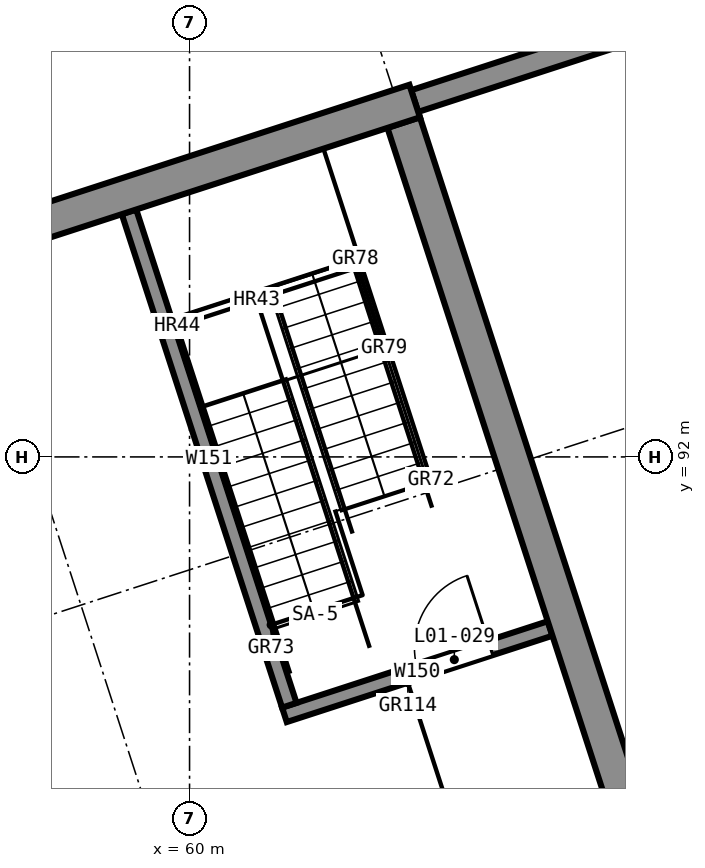
"""IFC4 building model, lengths in metres.
Left out: names, types, materials, properties, quantities, classifications, styles, units other than length and angle.
Written with IfcOpenShell. Run it as: python <this file> out.ifc"""

import sys

from ifc_helpers import new_model, si_unit, direction, frame, frame_2d, origin, place, context, subcontext, project, spatial, rectangle, extrude, element, fill, save


model = new_model("IFC4")
c1 = context("Model", 3, precision=1e-05, world=origin(), true_north=direction((0.0, 1.0)))
c2 = subcontext(c1, "Body", "Model", "MODEL_VIEW")
j1 = project(units=[si_unit("LENGTHUNIT", "METRE"), si_unit("PLANEANGLEUNIT", "RADIAN")], contexts=[c1])
p1 = place(None, origin())
s1 = spatial("IfcSite", under=j1, at=p1, CompositionType="ELEMENT")
p2 = place(p1, origin())
s2 = spatial("IfcBuilding", under=s1, at=p2, CompositionType="ELEMENT")
p3 = place(p2, frame((0.0, 0.0, 5.5)))
s3 = spatial("IfcBuildingStorey", under=s2, at=p3, CompositionType="ELEMENT", Elevation=5.5)
p4 = place(p3, frame((68.866, 77.781, 0.0), z_axis=(0.0, 0.0, 1.0), x_axis=(-0.309019798438, 0.951055605195, 0.0)))
e1 = element("IfcWall", 1, at=p4, inside=s3, PredefinedType="SHEAR", context=c2, shape_type="SweptSolid", body=[
    extrude(rectangle(XDim=19.575, YDim=0.45, at=frame_2d((9.788, 0.0))), origin(), (0.0, 0.0, 1.0), 4.0),
])
p5 = place(p3, frame((34.953, 87.581, 0.0), z_axis=(0.0, 0.0, 1.0), x_axis=(0.951059165148, 0.309008841924, 0.0)))
e2 = element("IfcWall", 2, at=p5, inside=s3, PredefinedType="SHEAR", context=c2, shape_type="SweptSolid", body=[
    extrude(rectangle(XDim=29.45, YDim=0.45, at=frame_2d((14.725, 0.0))), origin(), (0.0, 0.0, 1.0), 4.0),
])
p6 = place(p3, frame((71.45, 99.44, 0.0), z_axis=(0.0, 0.0, 1.0), x_axis=(-0.951052360452, -0.309029784452, 0.0)))
e3 = element("IfcWall", 3, at=p6, inside=s3, PredefinedType="SOLIDWALL", context=c2, shape_type="SweptSolid", body=[
    extrude(rectangle(XDim=8.925, YDim=0.3, at=frame_2d((4.462, 0.0))), origin(), (0.0, 0.0, 1.0), 4.0),
])
p7 = place(p3, frame((64.743, 89.743, 0.0), z_axis=(0.0, 0.0, 1.0), x_axis=(-0.95104773735, -0.309044011885, 0.0)))
e4 = element("IfcWall", 4, at=p7, inside=s3, PredefinedType="SOLIDWALL", context=c2, shape_type="SweptSolid", body=[
    extrude(rectangle(XDim=3.675, YDim=0.2, at=frame_2d((1.837, 0.0))), origin(), (0.0, 0.0, 1.0), 4.0),
])
p8 = place(p7, frame((0.825, 0.0, 0.0)))
e5 = element("IfcOpeningElement", 5, at=p8, cuts=e4, PredefinedType="OPENING", context=c2, shape_type="SweptSolid", body=[
    extrude(rectangle(XDim=1.0, YDim=2.1, at=frame_2d((0.5, 1.05))), frame((0.0, 0.11, 0.0), z_axis=(0.0, -1.0, 0.0), x_axis=(1.0, 0.0, 0.0)), (0.0, 0.0, 1.0), 0.22),
])
p9 = place(p3, frame((61.312, 88.733, 0.0), z_axis=(0.0, 0.0, 1.0), x_axis=(-0.309028643499, 0.951052731186, 0.0)))
e6 = element("IfcWall", 6, at=p9, inside=s3, PredefinedType="SOLIDWALL", context=c2, shape_type="SweptSolid", body=[
    extrude(rectangle(XDim=6.825, YDim=0.2, at=frame_2d((3.413, 0.0))), origin(), (0.0, 0.0, 1.0), 4.0),
])
p10 = place(p8, frame((1.0, 0.0, 0.0), z_axis=(0.0, 0.0, 1.0), x_axis=(-1.0, 0.0, 0.0)))
e7 = element("IfcDoor", 7, at=p10, inside=s3, OperationType="SINGLE_SWING_LEFT", PredefinedType="DOOR", context=c2, shape_type="SweptSolid", body=[
    extrude(rectangle(XDim=1.0, YDim=2.1, at=frame_2d((0.5, 1.05))), frame((0.0, 0.025, 0.0), z_axis=(0.0, -1.0, 0.0), x_axis=(1.0, 0.0, 0.0)), (0.0, 0.0, 1.0), 0.05),
])
fill(e5, e7)
save(model, sys.argv[1])
